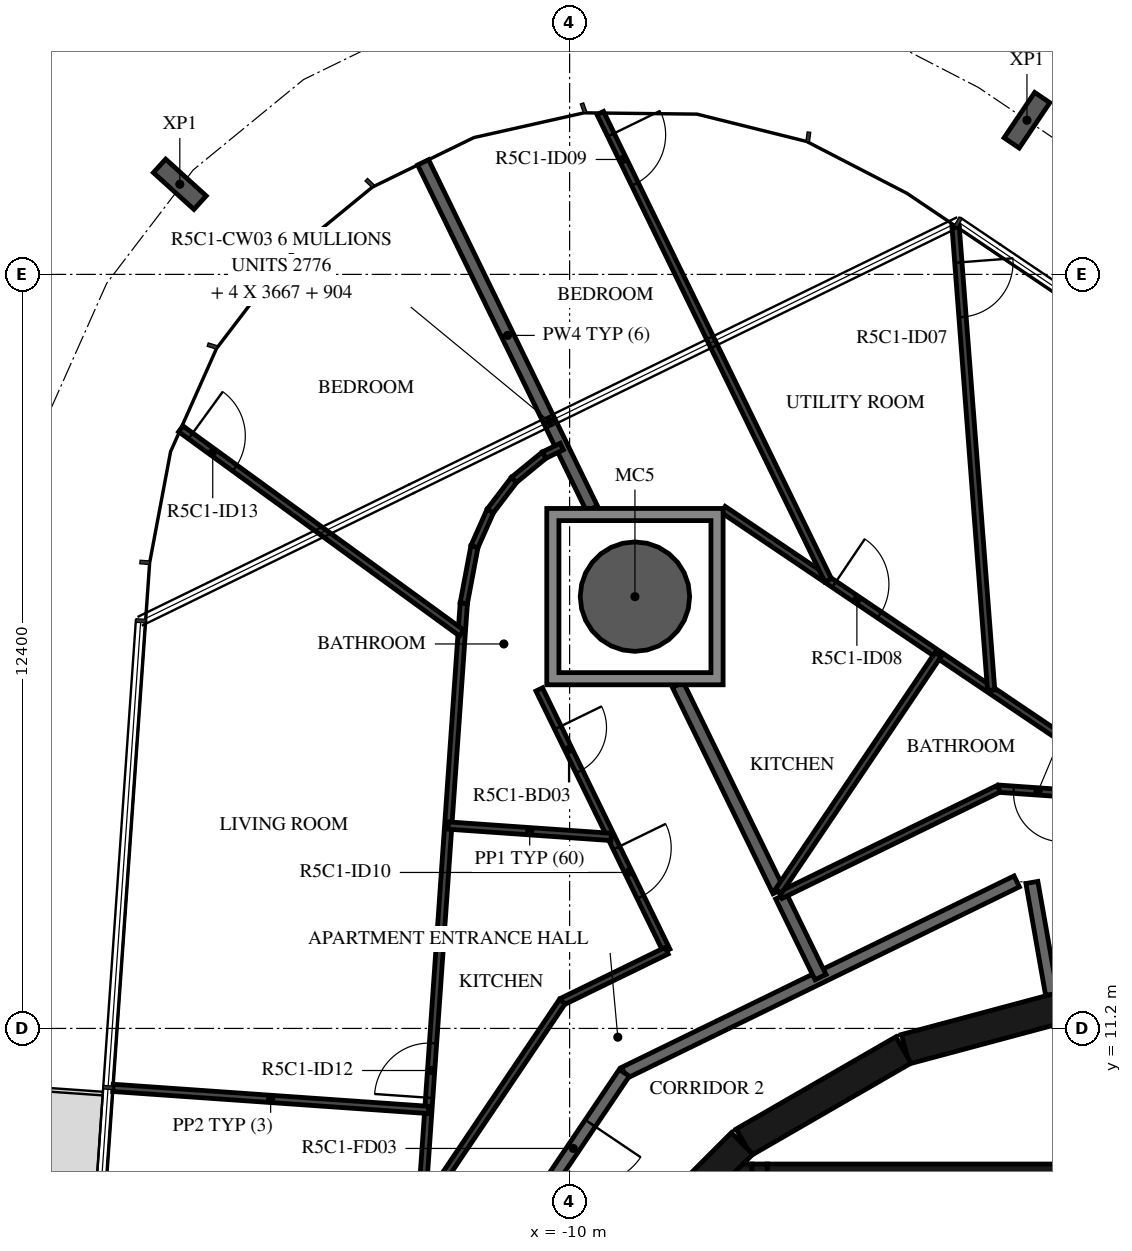
"""IFC4 building model, lengths in metres.
Left out: names, types, materials, properties, quantities, classifications, styles, units other than length and angle.
Written with IfcOpenShell. Run it as: python <this file> out.ifc"""

import sys

from ifc_helpers import new_model, si_unit, direction, frame, frame_2d, origin, origin_2d, place, context, subcontext, project, spatial, polyline, rectangle, hollow_circle, i_section, outline, extrude, element, fill, save


model = new_model("IFC4")
c1 = context("Model", 3, precision=1e-05, world=origin(), true_north=direction((0.0, 1.0)))
c2 = subcontext(c1, "Body", "Model", "MODEL_VIEW")
j1 = project(units=[si_unit("LENGTHUNIT", "METRE"), si_unit("PLANEANGLEUNIT", "RADIAN")], contexts=[c1])
p1 = place(None, origin())
s1 = spatial("IfcSite", under=j1, at=p1, CompositionType="ELEMENT")
p2 = place(p1, origin())
s2 = spatial("IfcBuilding", under=s1, at=p2, CompositionType="ELEMENT")
p3 = place(p2, frame((0.0, 0.0, 212.9)))
s3 = spatial("IfcBuildingStorey", under=s2, at=p3, CompositionType="ELEMENT", Elevation=212.9)
p4 = place(p3, frame((-8.926, 18.301, -0.38), z_axis=(0.0, 0.0, 1.0), x_axis=(1.0, 0.0, 0.0)))
e1 = element("IfcColumn", 1, at=p4, inside=s3, PredefinedType="COLUMN", context=c2, shape_type="SweptSolid", body=[
    extrude(hollow_circle(Radius=0.9, WallThickness=0.04, at=origin_2d()), origin(), (0.0, 0.0, 1.0), 3.5),
])
for number, where, z_axis, x_axis in (
    (2, (-2.479, 26.135, -0.38), (0.0, 0.0, 1.0), (0.829, -0.559, 0.0)),
    (3, (-16.411, 25.082, -0.38), (0.0, 0.0, 1.0), (0.671, 0.741, 0.0)),
):
    element("IfcColumn", number, at=place(p3, frame(where, z_axis=z_axis, x_axis=x_axis)), inside=s3, PredefinedType="COLUMN", context=c2, shape_type="SweptSolid", body=[
        extrude(i_section(OverallWidth=0.3, OverallDepth=0.9, WebThickness=0.019, FlangeThickness=0.035, FilletRadius=0.03, at=origin_2d()), origin(), (0.0, 0.0, 1.0), 3.5),
    ])
for number, where, z_axis, x_axis in (
    (4, (-1.55, 11.643, 0.0), (0.0, 0.0, 1.0), (-0.966, -0.259, 0.0)),
    (5, (-4.51, 10.845, 0.0), (0.0, 0.0, 1.0), (-0.866, -0.5, 0.0)),
):
    element("IfcWall", number, at=place(p3, frame(where, z_axis=z_axis, x_axis=x_axis)), inside=s3, PredefinedType="SHEAR", context=c2, shape_type="SweptSolid", body=[
        extrude(rectangle(XDim=3.033, YDim=0.5, at=frame_2d((1.516, 0.0))), origin(), (0.0, 0.0, 1.0), 3.12),
    ])
p5 = place(p3, frame((-7.164, 9.308, 0.0), z_axis=(0.0, 0.0, 1.0), x_axis=(-0.707106781187, -0.707106781187, 0.0)))
e6 = element("IfcWall", 6, at=p5, inside=s3, PredefinedType="SHEAR", context=c2, shape_type="SweptSolid", body=[
    extrude(rectangle(XDim=3.032, YDim=0.5, at=frame_2d((1.516, 0.0))), origin(), (0.0, 0.0, 1.0), 3.12),
])
p6 = place(p5, frame((1.416, 0.0, 0.0)))
e7 = element("IfcOpeningElement", 7, at=p6, cuts=e6, PredefinedType="OPENING", context=c2, shape_type="SweptSolid", body=[
    extrude(rectangle(XDim=1.2, YDim=2.1, at=frame_2d((0.6, 1.05))), frame((0.0, 0.26, 0.0), z_axis=(0.0, -1.0, 0.0), x_axis=(1.0, 0.0, 0.0)), (0.0, 0.0, 1.0), 0.52),
])
p7 = place(p3, frame((-6.75, 8.82, 0.0), z_axis=(0.0, 0.0, 1.0), x_axis=(1.0, 0.0, 0.0)))
e8 = element("IfcWall", 8, at=p7, inside=s3, PredefinedType="SHEAR", context=c2, shape_type="SweptSolid", body=[
    extrude(rectangle(XDim=6.75, YDim=0.3, at=frame_2d((3.375, 0.0))), origin(), (0.0, 0.0, 1.0), 3.12),
])
p8 = place(p3, frame((-6.875, 8.97, 0.0), z_axis=(0.0, 0.0, 1.0), x_axis=(0.0, -1.0, 0.0)))
e9 = element("IfcWall", 9, at=p8, inside=s3, PredefinedType="SHEAR", context=c2, shape_type="SweptSolid", body=[
    extrude(rectangle(XDim=3.92, YDim=0.25, at=frame_2d((1.96, 0.0))), origin(), (0.0, 0.0, 1.0), 3.12),
])
p9 = place(p8, frame((1.61, 0.0, 0.0)))
e10 = element("IfcOpeningElement", 10, at=p9, cuts=e9, PredefinedType="OPENING", context=c2, shape_type="SweptSolid", body=[
    extrude(rectangle(XDim=1.2, YDim=2.1, at=frame_2d((0.6, 1.05))), frame((0.0, 0.135, 0.0), z_axis=(0.0, -1.0, 0.0), x_axis=(1.0, 0.0, 0.0)), (0.0, 0.0, 1.0), 0.27),
])
p10 = place(p3, origin())
e11 = element("IfcWall", 11, at=p10, inside=s3, PredefinedType="SHEAR", context=c2, shape_type="SweptSolid", body=[
    extrude(outline(polyline([(-7.148, 8.97), (-7.0, 8.97), (-7.0, 8.67), (-7.448, 8.67), (-7.148, 8.97)])), origin(), (0.0, 0.0, 1.0), 3.12),
])
p11 = place(p3, frame((-2.074, 11.761, 0.0), z_axis=(0.0, 0.0, 1.0), x_axis=(-0.173740587112, 0.984791454263, 0.0)))
e12 = element("IfcWall", 12, at=p11, inside=s3, PredefinedType="STANDARD", context=c2, shape_type="SweptSolid", body=[
    extrude(rectangle(XDim=1.867, YDim=0.2, at=frame_2d((0.934, 0.0))), origin(), (0.0, 0.0, 1.0), 3.12),
])
p12 = place(p3, frame((-2.647, 13.618, 0.0), z_axis=(0.0, 0.0, 1.0), x_axis=(-0.898796543751, -0.438366026218, 0.0)))
e13 = element("IfcWall", 13, at=p12, inside=s3, PredefinedType="STANDARD", context=c2, shape_type="SweptSolid", body=[
    extrude(rectangle(XDim=7.181, YDim=0.2, at=frame_2d((3.591, 0.0))), origin(), (0.0, 0.0, 1.0), 3.12),
])
p13 = place(p3, frame((-9.101, 10.47, 0.0), z_axis=(0.0, 0.0, 1.0), x_axis=(-0.559195469534, -0.829035841718, 0.0)))
e14 = element("IfcWall", 14, at=p13, inside=s3, PredefinedType="STANDARD", context=c2, shape_type="SweptSolid", body=[
    extrude(rectangle(XDim=7.181, YDim=0.2, at=frame_2d((3.591, 0.0))), origin(), (0.0, 0.0, 1.0), 3.12),
])
p14 = place(p13, frame((1.0, 0.0, 0.0)))
e15 = element("IfcOpeningElement", 15, at=p14, cuts=e14, PredefinedType="OPENING", context=c2, shape_type="SweptSolid", body=[
    extrude(rectangle(XDim=1.0, YDim=2.1, at=frame_2d((0.5, 1.05))), frame((0.0, 0.11, 0.0), z_axis=(0.0, -1.0, 0.0), x_axis=(1.0, 0.0, 0.0)), (0.0, 0.0, 1.0), 0.22),
])
p15 = place(p3, frame((-6.522, 13.373, 0.0), z_axis=(0.0, 0.0, 1.0), x_axis=(0.438277270821, -0.8988398266, 0.0)))
e16 = element("IfcWall", 16, at=p15, inside=s3, PredefinedType="STANDARD", context=c2, shape_type="SweptSolid", body=[
    extrude(rectangle(XDim=1.479, YDim=0.2, at=frame_2d((0.74, 0.0))), origin(), (0.0, 0.0, 1.0), 3.12),
])
p16 = place(p3, frame((-8.219, 16.851, 0.0), z_axis=(0.0, 0.0, 1.0), x_axis=(0.438291091101, -0.898833087654, 0.0)))
e17 = element("IfcWall", 17, at=p16, inside=s3, PredefinedType="STANDARD", context=c2, shape_type="SweptSolid", body=[
    extrude(rectangle(XDim=3.774, YDim=0.2, at=frame_2d((1.887, 0.0))), origin(), (0.0, 0.0, 1.0), 3.12),
])
p17 = place(p3, frame((-12.409, 25.442, 0.0), z_axis=(0.0, 0.0, 1.0), x_axis=(0.43838641251, -0.898786600549, 0.0)))
e18 = element("IfcWall", 18, at=p17, inside=s3, PredefinedType="STANDARD", context=c2, shape_type="SweptSolid", body=[
    extrude(rectangle(XDim=6.333, YDim=0.2, at=frame_2d((3.166, 0.0))), origin(), (0.0, 0.0, 1.0), 3.12),
])
p18 = place(p3, frame((4.477, 14.623, 0.0), z_axis=(0.0, 0.0, 1.0), x_axis=(-0.997564862172, 0.069744861884, 0.0)))
e19 = element("IfcWall", 19, at=p18, inside=s3, PredefinedType="PARTITIONING", context=c2, shape_type="SweptSolid", body=[
    extrude(rectangle(XDim=7.438, YDim=0.12, at=frame_2d((3.719, 0.0))), origin(), (0.0, 0.0, 1.0), 3.12),
])
p19 = place(p18, frame((0.2, 0.0, 0.0)))
e20 = element("IfcOpeningElement", 20, at=p19, cuts=e19, PredefinedType="OPENING", context=c2, shape_type="SweptSolid", body=[
    extrude(rectangle(XDim=0.9, YDim=2.1, at=frame_2d((0.45, 1.05))), frame((0.0, 0.07, 0.0), z_axis=(0.0, -1.0, 0.0), x_axis=(1.0, 0.0, 0.0)), (0.0, 0.0, 1.0), 0.14),
])
p20 = place(p18, frame((6.392, 0.0, 0.0)))
e21 = element("IfcOpeningElement", 21, at=p20, cuts=e19, PredefinedType="OPENING", context=c2, shape_type="SweptSolid", body=[
    extrude(rectangle(XDim=0.8, YDim=2.1, at=frame_2d((0.4, 1.05))), frame((0.0, 0.07, 0.0), z_axis=(0.0, -1.0, 0.0), x_axis=(1.0, 0.0, 0.0)), (0.0, 0.0, 1.0), 0.14),
])
p21 = place(p3, frame((-2.943, 15.142, 0.0), z_axis=(0.0, 0.0, 1.0), x_axis=(-0.89881075705, -0.438336883014, 0.0)))
e22 = element("IfcWall", 22, at=p21, inside=s3, PredefinedType="PARTITIONING", context=c2, shape_type="SweptSolid", body=[
    extrude(rectangle(XDim=3.992, YDim=0.12, at=frame_2d((1.996, 0.0))), origin(), (0.0, 0.0, 1.0), 3.12),
])
p22 = place(p3, frame((-7.476, 19.735, 0.0), z_axis=(0.0, 0.0, 1.0), x_axis=(0.829035412992, -0.559196105142, 0.0)))
e23 = element("IfcWall", 23, at=p22, inside=s3, PredefinedType="PARTITIONING", context=c2, shape_type="SweptSolid", body=[
    extrude(rectangle(XDim=8.531, YDim=0.12, at=frame_2d((4.266, 0.0))), origin(), (0.0, 0.0, 1.0), 3.12),
])
p23 = place(p22, frame((2.204, 0.0, 0.0)))
e24 = element("IfcOpeningElement", 24, at=p23, cuts=e23, PredefinedType="OPENING", context=c2, shape_type="SweptSolid", body=[
    extrude(rectangle(XDim=0.9, YDim=2.1, at=frame_2d((0.45, 1.05))), frame((0.0, 0.07, 0.0), z_axis=(0.0, -1.0, 0.0), x_axis=(1.0, 0.0, 0.0)), (0.0, 0.0, 1.0), 0.14),
])
p24 = place(p3, frame((-3.653, 24.394, 0.0), z_axis=(0.0, 0.0, 1.0), x_axis=(0.076513576433, -0.997068539581, 0.0)))
e25 = element("IfcWall", 25, at=p24, inside=s3, PredefinedType="PARTITIONING", context=c2, shape_type="SweptSolid", body=[
    extrude(rectangle(XDim=7.655, YDim=0.12, at=frame_2d((3.827, 0.0))), origin(), (0.0, 0.0, 1.0), 3.12),
])
p25 = place(p24, frame((0.6, 0.0, 0.0)))
e26 = element("IfcOpeningElement", 26, at=p25, cuts=e25, PredefinedType="OPENING", context=c2, shape_type="SweptSolid", body=[
    extrude(rectangle(XDim=0.9, YDim=2.1, at=frame_2d((0.45, 1.05))), frame((0.0, 0.07, 0.0), z_axis=(0.0, -1.0, 0.0), x_axis=(1.0, 0.0, 0.0)), (0.0, 0.0, 1.0), 0.14),
])
p26 = place(p3, frame((-3.939, 17.35, 0.0), z_axis=(0.0, 0.0, 1.0), x_axis=(-0.559193216274, -0.829037361566, 0.0)))
e27 = element("IfcWall", 27, at=p26, inside=s3, PredefinedType="PARTITIONING", context=c2, shape_type="SweptSolid", body=[
    extrude(rectangle(XDim=4.694, YDim=0.12, at=frame_2d((2.347, 0.0))), origin(), (0.0, 0.0, 1.0), 3.12),
])
p27 = place(p3, frame((-9.496, 26.254, 0.0), z_axis=(0.0, 0.0, 1.0), x_axis=(0.438361739807, -0.89879863433, 0.0)))
e28 = element("IfcWall", 28, at=p27, inside=s3, PredefinedType="PARTITIONING", context=c2, shape_type="SweptSolid", body=[
    extrude(rectangle(XDim=8.549, YDim=0.12, at=frame_2d((4.274, 0.0))), origin(), (0.0, 0.0, 1.0), 3.12),
])
p28 = place(p27, frame((0.4, 0.0, 0.0)))
e29 = element("IfcOpeningElement", 29, at=p28, cuts=e28, PredefinedType="OPENING", context=c2, shape_type="SweptSolid", body=[
    extrude(rectangle(XDim=0.9, YDim=2.1, at=frame_2d((0.45, 1.05))), frame((0.0, 0.07, 0.0), z_axis=(0.0, -1.0, 0.0), x_axis=(1.0, 0.0, 0.0)), (0.0, 0.0, 1.0), 0.14),
])
p29 = place(p3, frame((-10.5, 16.775, 0.0), z_axis=(0.0, 0.0, 1.0), x_axis=(0.438345136783, -0.898806731761, 0.0)))
e30 = element("IfcWall", 30, at=p29, inside=s3, PredefinedType="PARTITIONING", context=c2, shape_type="SweptSolid", body=[
    extrude(rectangle(XDim=4.78, YDim=0.12, at=frame_2d((2.39, 0.0))), origin(), (0.0, 0.0, 1.0), 3.12),
])
p30 = place(p29, frame((0.7, 0.0, 0.0)))
e31 = element("IfcOpeningElement", 31, at=p30, cuts=e30, PredefinedType="OPENING", context=c2, shape_type="SweptSolid", body=[
    extrude(rectangle(XDim=0.8, YDim=2.1, at=frame_2d((0.4, 1.05))), frame((0.0, 0.07, 0.0), z_axis=(0.0, -1.0, 0.0), x_axis=(1.0, 0.0, 0.0)), (0.0, 0.0, 1.0), 0.14),
])
p31 = place(p29, frame((2.899, 0.0, 0.0)))
e32 = element("IfcOpeningElement", 32, at=p31, cuts=e30, PredefinedType="OPENING", context=c2, shape_type="SweptSolid", body=[
    extrude(rectangle(XDim=0.9, YDim=2.1, at=frame_2d((0.45, 1.05))), frame((0.0, 0.07, 0.0), z_axis=(0.0, -1.0, 0.0), x_axis=(1.0, 0.0, 0.0)), (0.0, 0.0, 1.0), 0.14),
])
p32 = place(p3, frame((-8.405, 12.479, 0.0), z_axis=(0.0, 0.0, 1.0), x_axis=(-0.898784427692, -0.438390867307, 0.0)))
e33 = element("IfcWall", 33, at=p32, inside=s3, PredefinedType="PARTITIONING", context=c2, shape_type="SweptSolid", body=[
    extrude(rectangle(XDim=1.908, YDim=0.12, at=frame_2d((0.954, 0.0))), origin(), (0.0, 0.0, 1.0), 3.12),
])
p33 = place(p3, frame((-10.12, 11.642, 0.0), z_axis=(0.0, 0.0, 1.0), x_axis=(-0.55920080659, -0.829032241779, 0.0)))
e34 = element("IfcWall", 34, at=p33, inside=s3, PredefinedType="PARTITIONING", context=c2, shape_type="SweptSolid", body=[
    extrude(rectangle(XDim=7.985, YDim=0.12, at=frame_2d((3.992, 0.0))), origin(), (0.0, 0.0, 1.0), 3.12),
])
p34 = place(p33, frame((4.346, 0.0, 0.0)))
e35 = element("IfcOpeningElement", 35, at=p34, cuts=e34, PredefinedType="OPENING", context=c2, shape_type="SweptSolid", body=[
    extrude(rectangle(XDim=0.9, YDim=2.1, at=frame_2d((0.45, 1.05))), frame((0.0, 0.07, 0.0), z_axis=(0.0, -1.0, 0.0), x_axis=(1.0, 0.0, 0.0)), (0.0, 0.0, 1.0), 0.14),
])
p35 = place(p3, frame((-12.439, 8.204, 0.0), z_axis=(0.0, 0.0, 1.0), x_axis=(0.069750037523, 0.997564500303, 0.0)))
e36 = element("IfcWall", 36, at=p35, inside=s3, PredefinedType="PARTITIONING", context=c2, shape_type="SweptSolid", body=[
    extrude(rectangle(XDim=10.014, YDim=0.12, at=frame_2d((5.007, 0.0))), origin(), (0.0, 0.0, 1.0), 3.12),
])
p36 = place(p35, frame((1.859, 0.0, 0.0)))
e37 = element("IfcOpeningElement", 37, at=p36, cuts=e36, PredefinedType="OPENING", context=c2, shape_type="SweptSolid", body=[
    extrude(rectangle(XDim=0.9, YDim=2.1, at=frame_2d((0.45, 1.05))), frame((0.0, 0.07, 0.0), z_axis=(0.0, -1.0, 0.0), x_axis=(1.0, 0.0, 0.0)), (0.0, 0.0, 1.0), 0.14),
])
p37 = place(p3, frame((-11.74, 18.194, 0.0), z_axis=(0.0, 0.0, 1.0), x_axis=(0.185144760846, 0.982711258474, 0.0)))
e38 = element("IfcWall", 38, at=p37, inside=s3, PredefinedType="PARTITIONING", context=c2, shape_type="SweptSolid", body=[
    extrude(rectangle(XDim=0.947, YDim=0.12, at=frame_2d((0.473, 0.0))), origin(), (0.0, 0.0, 1.0), 3.12),
])
for number, where, z_axis, x_axis in (
    (39, (-11.565, 19.125, 0.0), (0.0, 0.0, 1.0), (0.407, 0.914, 0.0)),
    (40, (-11.304, 19.711, 0.0), (0.0, 0.0, 1.0), (0.607, 0.795, 0.0)),
    (41, (-10.915, 20.221, 0.0), (0.0, 0.0, 1.0), (0.773, 0.634, 0.0)),
):
    element("IfcWall", number, at=place(p3, frame(where, z_axis=z_axis, x_axis=x_axis)), inside=s3, PredefinedType="PARTITIONING", context=c2, shape_type="SweptSolid", body=[
        extrude(rectangle(XDim=0.642, YDim=0.12, at=frame_2d((0.321, 0.0))), origin(), (0.0, 0.0, 1.0), 3.12),
    ])
p38 = place(p3, frame((-10.418, 20.628, 0.0), z_axis=(0.0, 0.0, 1.0), x_axis=(0.898943795765, 0.438063981692, 0.0)))
e42 = element("IfcWall", 42, at=p38, inside=s3, PredefinedType="PARTITIONING", context=c2, shape_type="SweptSolid", body=[
    extrude(rectangle(XDim=0.321, YDim=0.12, at=frame_2d((0.161, 0.0))), origin(), (0.0, 0.0, 1.0), 3.12),
])
p39 = place(p3, frame((-16.395, 21.061, 0.0), z_axis=(0.0, 0.0, 1.0), x_axis=(0.808810002497, -0.58807004673, 0.0)))
e43 = element("IfcWall", 43, at=p39, inside=s3, PredefinedType="PARTITIONING", context=c2, shape_type="SweptSolid", body=[
    extrude(rectangle(XDim=5.713, YDim=0.12, at=frame_2d((2.856, 0.0))), origin(), (0.0, 0.0, 1.0), 3.12),
])
p40 = place(p39, frame((0.2, 0.0, 0.0)))
e44 = element("IfcOpeningElement", 44, at=p40, cuts=e43, PredefinedType="OPENING", context=c2, shape_type="SweptSolid", body=[
    extrude(rectangle(XDim=0.9, YDim=2.1, at=frame_2d((0.45, 1.05))), frame((0.0, 0.07, 0.0), z_axis=(0.0, -1.0, 0.0), x_axis=(1.0, 0.0, 0.0)), (0.0, 0.0, 1.0), 0.14),
])
p41 = place(p3, frame((-11.996, 14.536, 0.0), z_axis=(0.0, 0.0, 1.0), x_axis=(0.997565991425, -0.069728708231, 0.0)))
e45 = element("IfcWall", 45, at=p41, inside=s3, PredefinedType="PARTITIONING", context=c2, shape_type="SweptSolid", body=[
    extrude(rectangle(XDim=2.686, YDim=0.12, at=frame_2d((1.343, 0.0))), origin(), (0.0, 0.0, 1.0), 3.12),
])
p42 = place(p3, frame((-17.51, 10.222, 0.0), z_axis=(0.0, 0.0, 1.0), x_axis=(0.997563184303, -0.069768856397, 0.0)))
e46 = element("IfcWall", 46, at=p42, inside=s3, PredefinedType="PARTITIONING", context=c2, shape_type="SweptSolid", body=[
    extrude(rectangle(XDim=5.2, YDim=0.12, at=frame_2d((2.6, 0.0))), origin(), (0.0, 0.0, 1.0), 2.73),
])
p43 = place(p3, origin())
e47 = element("IfcWall", 47, at=p43, inside=s3, PredefinedType="STANDARD", context=c2, shape_type="SweptSolid", body=[
    extrude(outline(polyline([(-7.476, 19.751), (-7.476, 16.851), (-10.376, 16.851), (-10.376, 19.751), (-7.476, 19.751)]), holes=[polyline([(-10.176, 17.051), (-7.676, 17.051), (-7.676, 19.551), (-10.176, 19.551), (-10.176, 17.051)])]), origin(), (0.0, 0.0, 1.0), 3.12),
])
p44 = place(p20, origin())
e48 = element("IfcDoor", 48, at=p44, inside=s3, OperationType="SINGLE_SWING_RIGHT", PredefinedType="DOOR", context=c2, shape_type="SweptSolid", body=[
    extrude(rectangle(XDim=0.8, YDim=2.1, at=frame_2d((0.4, 1.05))), frame((0.0, 0.025, 0.0), z_axis=(0.0, -1.0, 0.0), x_axis=(1.0, 0.0, 0.0)), (0.0, 0.0, 1.0), 0.05),
])
fill(e21, e48)
p45 = place(p25, origin())
e49 = element("IfcDoor", 49, at=p45, inside=s3, OperationType="SINGLE_SWING_RIGHT", PredefinedType="DOOR", context=c2, shape_type="SweptSolid", body=[
    extrude(rectangle(XDim=0.9, YDim=2.1, at=frame_2d((0.45, 1.05))), frame((0.0, 0.025, 0.0), z_axis=(0.0, -1.0, 0.0), x_axis=(1.0, 0.0, 0.0)), (0.0, 0.0, 1.0), 0.05),
])
fill(e26, e49)
p46 = place(p23, origin())
e50 = element("IfcDoor", 50, at=p46, inside=s3, OperationType="SINGLE_SWING_LEFT", PredefinedType="DOOR", context=c2, shape_type="SweptSolid", body=[
    extrude(rectangle(XDim=0.9, YDim=2.1, at=frame_2d((0.45, 1.05))), frame((0.0, 0.025, 0.0), z_axis=(0.0, -1.0, 0.0), x_axis=(1.0, 0.0, 0.0)), (0.0, 0.0, 1.0), 0.05),
])
fill(e24, e50)
p47 = place(p28, origin())
e51 = element("IfcDoor", 51, at=p47, inside=s3, OperationType="SINGLE_SWING_RIGHT", PredefinedType="DOOR", context=c2, shape_type="SweptSolid", body=[
    extrude(rectangle(XDim=0.9, YDim=2.1, at=frame_2d((0.45, 1.05))), frame((0.0, 0.025, 0.0), z_axis=(0.0, -1.0, 0.0), x_axis=(1.0, 0.0, 0.0)), (0.0, 0.0, 1.0), 0.05),
])
fill(e29, e51)
p48 = place(p14, origin())
e52 = element("IfcDoor", 52, at=p48, inside=s3, OperationType="SINGLE_SWING_LEFT", PredefinedType="DOOR", context=c2, shape_type="SweptSolid", body=[
    extrude(rectangle(XDim=1.0, YDim=2.1, at=frame_2d((0.5, 1.05))), frame((0.0, 0.025, 0.0), z_axis=(0.0, -1.0, 0.0), x_axis=(1.0, 0.0, 0.0)), (0.0, 0.0, 1.0), 0.05),
])
fill(e15, e52)
p49 = place(p30, origin())
e53 = element("IfcDoor", 53, at=p49, inside=s3, OperationType="SINGLE_SWING_LEFT", PredefinedType="DOOR", context=c2, shape_type="SweptSolid", body=[
    extrude(rectangle(XDim=0.8, YDim=2.1, at=frame_2d((0.4, 1.05))), frame((0.0, 0.025, 0.0), z_axis=(0.0, -1.0, 0.0), x_axis=(1.0, 0.0, 0.0)), (0.0, 0.0, 1.0), 0.05),
])
fill(e31, e53)
p50 = place(p31, origin())
e54 = element("IfcDoor", 54, at=p50, inside=s3, OperationType="SINGLE_SWING_LEFT", PredefinedType="DOOR", context=c2, shape_type="SweptSolid", body=[
    extrude(rectangle(XDim=0.9, YDim=2.1, at=frame_2d((0.45, 1.05))), frame((0.0, 0.025, 0.0), z_axis=(0.0, -1.0, 0.0), x_axis=(1.0, 0.0, 0.0)), (0.0, 0.0, 1.0), 0.05),
])
fill(e32, e54)
p51 = place(p36, origin())
e55 = element("IfcDoor", 55, at=p51, inside=s3, OperationType="SINGLE_SWING_LEFT", PredefinedType="DOOR", context=c2, shape_type="SweptSolid", body=[
    extrude(rectangle(XDim=0.9, YDim=2.1, at=frame_2d((0.45, 1.05))), frame((0.0, 0.025, 0.0), z_axis=(0.0, -1.0, 0.0), x_axis=(1.0, 0.0, 0.0)), (0.0, 0.0, 1.0), 0.05),
])
fill(e37, e55)
p52 = place(p40, origin())
e56 = element("IfcDoor", 56, at=p52, inside=s3, OperationType="SINGLE_SWING_LEFT", PredefinedType="DOOR", context=c2, shape_type="SweptSolid", body=[
    extrude(rectangle(XDim=0.9, YDim=2.1, at=frame_2d((0.45, 1.05))), frame((0.0, 0.025, 0.0), z_axis=(0.0, -1.0, 0.0), x_axis=(1.0, 0.0, 0.0)), (0.0, 0.0, 1.0), 0.05),
])
fill(e44, e56)
save(model, sys.argv[1])
